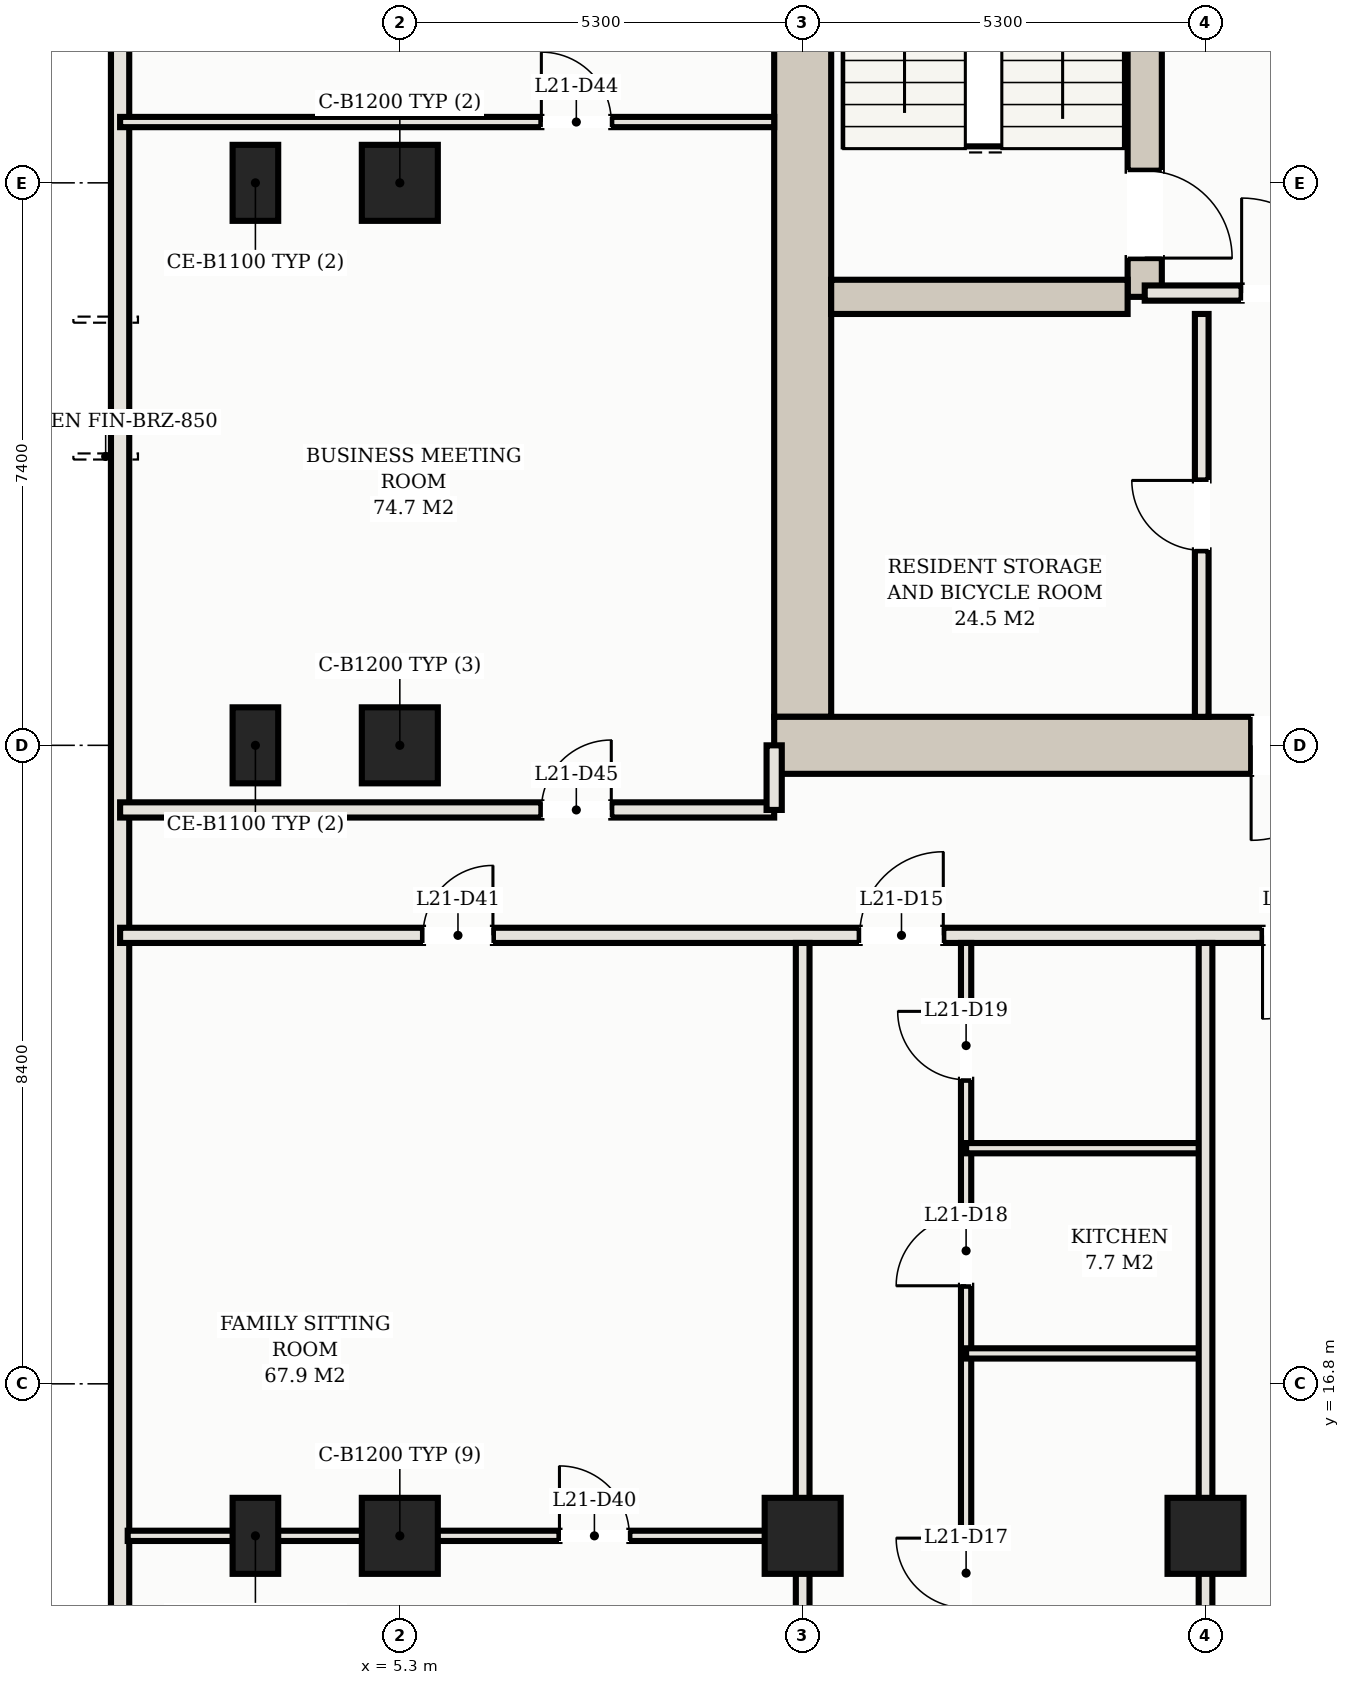
"""IFC4 building model, lengths in metres.
Left out: names, types, materials, properties, quantities, classifications, styles, units other than length and angle.
Written with IfcOpenShell. Run it as: python <this file> out.ifc"""

import sys

from ifc_helpers import new_model, si_unit, direction, frame, frame_2d, origin, origin_2d, place, context, subcontext, project, spatial, rectangle, hollow_rectangle, extrude, element, fill, save


model = new_model("IFC4")
c1 = context("Model", 3, precision=1e-05, world=origin(), true_north=direction((0.0, 1.0)))
c2 = subcontext(c1, "Body", "Model", "MODEL_VIEW")
j1 = project(units=[si_unit("LENGTHUNIT", "METRE"), si_unit("PLANEANGLEUNIT", "RADIAN")], contexts=[c1])
p1 = place(None, origin())
s1 = spatial("IfcSite", under=j1, at=p1, CompositionType="ELEMENT")
p2 = place(p1, origin())
s2 = spatial("IfcBuilding", under=s1, at=p2, CompositionType="ELEMENT")
p3 = place(p2, frame((0.0, 0.0, 81.7)))
s3 = spatial("IfcBuildingStorey", under=s2, at=p3, CompositionType="ELEMENT", Elevation=81.7)
p4 = place(p3, frame((10.6, 25.575, 0.0), z_axis=(0.0, 0.0, 1.0), x_axis=(0.0, 1.0, 0.0)))
e1 = element("IfcWall", 1, at=p4, inside=s3, PredefinedType="SHEAR", context=c2, shape_type="SweptSolid", body=[
    extrude(rectangle(XDim=14.05, YDim=0.75, at=frame_2d((7.025, 0.0))), origin(), (0.0, 0.0, 1.0), 3.09),
])
p5 = place(p3, frame((10.225, 25.2, 0.0), z_axis=(0.0, 0.0, 1.0), x_axis=(1.0, 0.0, 0.0)))
e2 = element("IfcWall", 2, at=p5, inside=s3, PredefinedType="SHEAR", context=c2, shape_type="SweptSolid", body=[
    extrude(rectangle(XDim=8.175, YDim=0.75, at=frame_2d((4.087, 0.0))), origin(), (0.0, 0.0, 1.0), 3.09),
])
p6 = place(p5, frame((6.275, 0.0, 0.0)))
e3 = element("IfcOpeningElement", 3, at=p6, cuts=e2, PredefinedType="OPENING", context=c2, shape_type="SweptSolid", body=[
    extrude(rectangle(XDim=1.25, YDim=2.2, at=frame_2d((0.625, 1.1))), frame((0.0, 0.385, 0.0), z_axis=(0.0, -1.0, 0.0), x_axis=(1.0, 0.0, 0.0)), (0.0, 0.0, 1.0), 0.77),
])
p7 = place(p3, frame((15.1, 31.1, 0.0), z_axis=(0.0, 0.0, 1.0), x_axis=(0.0, 1.0, 0.0)))
e4 = element("IfcWall", 4, at=p7, inside=s3, PredefinedType="SHEAR", context=c2, shape_type="SweptSolid", body=[
    extrude(rectangle(XDim=8.525, YDim=0.45, at=frame_2d((4.262, 0.0))), origin(), (0.0, 0.0, 1.0), 3.09),
])
p8 = place(p7, frame((0.51, 0.0, 0.0)))
e5 = element("IfcOpeningElement", 5, at=p8, cuts=e4, PredefinedType="OPENING", context=c2, shape_type="SweptSolid", body=[
    extrude(rectangle(XDim=1.15, YDim=2.2, at=frame_2d((0.575, 1.1))), frame((0.0, 0.235, 0.0), z_axis=(0.0, -1.0, 0.0), x_axis=(1.0, 0.0, 0.0)), (0.0, 0.0, 1.0), 0.47),
])
p9 = place(p3, frame((10.975, 31.1, 0.0), z_axis=(0.0, 0.0, 1.0), x_axis=(1.0, 0.0, 0.0)))
e6 = element("IfcWall", 6, at=p9, inside=s3, PredefinedType="SHEAR", context=c2, shape_type="SweptSolid", body=[
    extrude(rectangle(XDim=3.9, YDim=0.45, at=frame_2d((1.95, 0.0))), origin(), (0.0, 0.0, 1.0), 3.09),
])
for number, where, z_axis, x_axis in (
    (7, (10.6, 14.8, 0.0), (0.0, 0.0, 1.0), (1.0, 0.0, 0.0)),
    (8, (15.9, 14.8, 0.0), (0.0, 0.0, 1.0), (1.0, 0.0, 0.0)),
):
    element("IfcColumn", number, at=place(p3, frame(where, z_axis=z_axis, x_axis=x_axis)), inside=s3, PredefinedType="COLUMN", context=c2, shape_type="SweptSolid", body=[
        extrude(hollow_rectangle(XDim=1.0, YDim=1.0, WallThickness=0.036, at=origin_2d()), origin(), (0.0, 0.0, 1.0), 3.3),
    ])
for number, where, z_axis, x_axis in (
    (9, (3.4, 14.8, 0.0), (0.0, 0.0, 1.0), (1.0, 0.0, 0.0)),
    (10, (3.4, 25.2, 0.0), (0.0, 0.0, 1.0), (1.0, 0.0, 0.0)),
    (11, (3.4, 32.6, 0.0), (0.0, 0.0, 1.0), (1.0, 0.0, 0.0)),
):
    element("IfcColumn", number, at=place(p3, frame(where, z_axis=z_axis, x_axis=x_axis)), inside=s3, PredefinedType="COLUMN", context=c2, shape_type="SweptSolid", body=[
        extrude(hollow_rectangle(XDim=0.6, YDim=1.0, WallThickness=0.032, at=origin_2d()), origin(), (0.0, 0.0, 1.0), 3.3),
    ])
for number, where, z_axis, x_axis in (
    (12, (5.3, 14.8, 0.0), (0.0, 0.0, 1.0), (1.0, 0.0, 0.0)),
    (13, (5.3, 25.2, 0.0), (0.0, 0.0, 1.0), (1.0, 0.0, 0.0)),
    (14, (5.3, 32.6, 0.0), (0.0, 0.0, 1.0), (1.0, 0.0, 0.0)),
):
    element("IfcColumn", number, at=place(p3, frame(where, z_axis=z_axis, x_axis=x_axis)), inside=s3, PredefinedType="COLUMN", context=c2, shape_type="SweptSolid", body=[
        extrude(hollow_rectangle(XDim=1.0, YDim=1.0, WallThickness=0.036, at=origin_2d()), origin(), (0.0, 0.0, 1.0), 3.3),
    ])
p10 = place(p3, frame((1.62, 35.33, 0.0), z_axis=(0.0, 0.0, 1.0), x_axis=(0.0, -1.0, 0.0)))
e15 = element("IfcWall", 15, at=p10, inside=s3, PredefinedType="SOLIDWALL", context=c2, shape_type="SweptSolid", body=[
    extrude(rectangle(XDim=28.41, YDim=0.24, at=frame_2d((14.205, 0.0))), origin(), (0.0, 0.0, 1.0), 3.09),
])
p11 = place(p3, frame((15.1, 31.15, 0.0), z_axis=(0.0, 0.0, 1.0), x_axis=(1.0, 0.0, 0.0)))
e16 = element("IfcWall", 16, at=p11, inside=s3, PredefinedType="PARTITIONING", context=c2, shape_type="SweptSolid", body=[
    extrude(rectangle(XDim=3.25, YDim=0.2, at=frame_2d((1.625, 0.0))), origin(), (0.0, 0.0, 1.0), 2.38),
])
p12 = place(p11, frame((1.275, 0.0, 0.0)))
e17 = element("IfcOpeningElement", 17, at=p12, cuts=e16, PredefinedType="OPENING", context=c2, shape_type="SweptSolid", body=[
    extrude(rectangle(XDim=1.25, YDim=2.2, at=frame_2d((0.625, 1.1))), frame((0.0, 0.11, 0.0), z_axis=(0.0, -1.0, 0.0), x_axis=(1.0, 0.0, 0.0)), (0.0, 0.0, 1.0), 0.22),
])
p13 = place(p3, frame((15.85, 25.575, 0.0), z_axis=(0.0, 0.0, 1.0), x_axis=(0.0, 1.0, 0.0)))
e18 = element("IfcWall", 18, at=p13, inside=s3, PredefinedType="PARTITIONING", context=c2, shape_type="SweptSolid", body=[
    extrude(rectangle(XDim=5.3, YDim=0.18, at=frame_2d((2.65, 0.0))), origin(), (0.0, 0.0, 1.0), 2.38),
])
p14 = place(p13, frame((2.19, 0.0, 0.0)))
e19 = element("IfcOpeningElement", 19, at=p14, cuts=e18, PredefinedType="OPENING", context=c2, shape_type="SweptSolid", body=[
    extrude(rectangle(XDim=0.92, YDim=2.15, at=frame_2d((0.46, 1.075))), frame((0.0, 0.1, 0.0), z_axis=(0.0, -1.0, 0.0), x_axis=(1.0, 0.0, 0.0)), (0.0, 0.0, 1.0), 0.2),
])
p15 = place(p3, frame((1.62, 22.7, 0.0), z_axis=(0.0, 0.0, 1.0), x_axis=(1.0, 0.0, 0.0)))
e20 = element("IfcWall", 20, at=p15, inside=s3, PredefinedType="PARTITIONING", context=c2, shape_type="SweptSolid", body=[
    extrude(rectangle(XDim=49.76, YDim=0.2, at=frame_2d((24.88, 0.0))), origin(), (0.0, 0.0, 1.0), 2.38),
])
p16 = place(p15, frame((9.73, 0.0, 0.0)))
e21 = element("IfcOpeningElement", 21, at=p16, cuts=e20, PredefinedType="OPENING", context=c2, shape_type="SweptSolid", body=[
    extrude(rectangle(XDim=1.1, YDim=2.25, at=frame_2d((0.55, 1.125))), frame((0.0, 0.11, 0.0), z_axis=(0.0, -1.0, 0.0), x_axis=(1.0, 0.0, 0.0)), (0.0, 0.0, 1.0), 0.22),
])
p17 = place(p15, frame((15.03, 0.0, 0.0)))
e22 = element("IfcOpeningElement", 22, at=p17, cuts=e20, PredefinedType="OPENING", context=c2, shape_type="SweptSolid", body=[
    extrude(rectangle(XDim=1.1, YDim=2.25, at=frame_2d((0.55, 1.125))), frame((0.0, 0.11, 0.0), z_axis=(0.0, -1.0, 0.0), x_axis=(1.0, 0.0, 0.0)), (0.0, 0.0, 1.0), 0.22),
])
p18 = place(p15, frame((20.33, 0.0, 0.0)))
e23 = element("IfcOpeningElement", 23, at=p18, cuts=e20, PredefinedType="OPENING", context=c2, shape_type="SweptSolid", body=[
    extrude(rectangle(XDim=1.1, YDim=2.25, at=frame_2d((0.55, 1.125))), frame((0.0, 0.11, 0.0), z_axis=(0.0, -1.0, 0.0), x_axis=(1.0, 0.0, 0.0)), (0.0, 0.0, 1.0), 0.22),
])
p19 = place(p15, frame((25.63, 0.0, 0.0)))
e24 = element("IfcOpeningElement", 24, at=p19, cuts=e20, PredefinedType="OPENING", context=c2, shape_type="SweptSolid", body=[
    extrude(rectangle(XDim=1.1, YDim=2.25, at=frame_2d((0.55, 1.125))), frame((0.0, 0.11, 0.0), z_axis=(0.0, -1.0, 0.0), x_axis=(1.0, 0.0, 0.0)), (0.0, 0.0, 1.0), 0.22),
])
p20 = place(p15, frame((33.33, 0.0, 0.0)))
e25 = element("IfcOpeningElement", 25, at=p20, cuts=e20, PredefinedType="OPENING", context=c2, shape_type="SweptSolid", body=[
    extrude(rectangle(XDim=1.1, YDim=2.25, at=frame_2d((0.55, 1.125))), frame((0.0, 0.11, 0.0), z_axis=(0.0, -1.0, 0.0), x_axis=(1.0, 0.0, 0.0)), (0.0, 0.0, 1.0), 0.22),
])
p21 = place(p15, frame((3.985, 0.0, 0.0)))
e26 = element("IfcOpeningElement", 26, at=p21, cuts=e20, PredefinedType="OPENING", context=c2, shape_type="SweptSolid", body=[
    extrude(rectangle(XDim=0.92, YDim=2.15, at=frame_2d((0.46, 1.075))), frame((0.0, 0.11, 0.0), z_axis=(0.0, -1.0, 0.0), x_axis=(1.0, 0.0, 0.0)), (0.0, 0.0, 1.0), 0.22),
])
p22 = place(p15, frame((44.855, 0.0, 0.0)))
e27 = element("IfcOpeningElement", 27, at=p22, cuts=e20, PredefinedType="OPENING", context=c2, shape_type="SweptSolid", body=[
    extrude(rectangle(XDim=0.92, YDim=2.15, at=frame_2d((0.46, 1.075))), frame((0.0, 0.11, 0.0), z_axis=(0.0, -1.0, 0.0), x_axis=(1.0, 0.0, 0.0)), (0.0, 0.0, 1.0), 0.22),
])
p23 = place(p3, frame((1.62, 24.35, 0.0), z_axis=(0.0, 0.0, 1.0), x_axis=(1.0, 0.0, 0.0)))
e28 = element("IfcWall", 28, at=p23, inside=s3, PredefinedType="PARTITIONING", context=c2, shape_type="SweptSolid", body=[
    extrude(rectangle(XDim=8.605, YDim=0.2, at=frame_2d((4.302, 0.0))), origin(), (0.0, 0.0, 1.0), 2.38),
])
p24 = place(p23, frame((5.542, 0.0, 0.0)))
e29 = element("IfcOpeningElement", 29, at=p24, cuts=e28, PredefinedType="OPENING", context=c2, shape_type="SweptSolid", body=[
    extrude(rectangle(XDim=0.92, YDim=2.15, at=frame_2d((0.46, 1.075))), frame((0.0, 0.11, 0.0), z_axis=(0.0, -1.0, 0.0), x_axis=(1.0, 0.0, 0.0)), (0.0, 0.0, 1.0), 0.22),
])
p25 = place(p3, frame((10.225, 24.35, 0.0), z_axis=(0.0, 0.0, 1.0), x_axis=(0.0, 1.0, 0.0)))
e30 = element("IfcWall", 30, at=p25, inside=s3, PredefinedType="PARTITIONING", context=c2, shape_type="SweptSolid", body=[
    extrude(rectangle(XDim=0.85, YDim=0.2, at=frame_2d((0.425, 0.0))), origin(), (0.0, 0.0, 1.0), 2.38),
])
p26 = place(p3, frame((10.6, 1.62, 0.0), z_axis=(0.0, 0.0, 1.0), x_axis=(0.0, 1.0, 0.0)))
e31 = element("IfcWall", 31, at=p26, inside=s3, PredefinedType="PARTITIONING", context=c2, shape_type="SweptSolid", body=[
    extrude(rectangle(XDim=20.98, YDim=0.18, at=frame_2d((10.49, 0.0))), origin(), (0.0, 0.0, 1.0), 2.335),
])
p27 = place(p3, frame((12.75, 11.42, 0.0), z_axis=(0.0, 0.0, 1.0), x_axis=(0.0, 1.0, 0.0)))
e32 = element("IfcWall", 32, at=p27, inside=s3, PredefinedType="PARTITIONING", context=c2, shape_type="SweptSolid", body=[
    extrude(rectangle(XDim=11.18, YDim=0.135, at=frame_2d((5.59, 0.0))), origin(), (0.0, 0.0, 1.0), 2.38),
])
p28 = place(p27, frame((2.43, 0.0, 0.0)))
e33 = element("IfcOpeningElement", 33, at=p28, cuts=e32, PredefinedType="OPENING", context=c2, shape_type="SweptSolid", body=[
    extrude(rectangle(XDim=0.92, YDim=2.15, at=frame_2d((0.46, 1.075))), frame((0.0, 0.078, 0.0), z_axis=(0.0, -1.0, 0.0), x_axis=(1.0, 0.0, 0.0)), (0.0, 0.0, 1.0), 0.155),
])
p29 = place(p27, frame((6.67, 0.0, 0.0)))
e34 = element("IfcOpeningElement", 34, at=p29, cuts=e32, PredefinedType="OPENING", context=c2, shape_type="SweptSolid", body=[
    extrude(rectangle(XDim=0.92, YDim=2.15, at=frame_2d((0.46, 1.075))), frame((0.0, 0.078, 0.0), z_axis=(0.0, -1.0, 0.0), x_axis=(1.0, 0.0, 0.0)), (0.0, 0.0, 1.0), 0.155),
])
p30 = place(p27, frame((9.38, 0.0, 0.0)))
e35 = element("IfcOpeningElement", 35, at=p30, cuts=e32, PredefinedType="OPENING", context=c2, shape_type="SweptSolid", body=[
    extrude(rectangle(XDim=0.9, YDim=2.15, at=frame_2d((0.45, 1.075))), frame((0.0, 0.078, 0.0), z_axis=(0.0, -1.0, 0.0), x_axis=(1.0, 0.0, 0.0)), (0.0, 0.0, 1.0), 0.155),
])
for number, where, z_axis, x_axis in (
    (36, (12.75, 17.2, 0.0), (0.0, 0.0, 1.0), (1.0, 0.0, 0.0)),
    (37, (12.75, 19.9, 0.0), (0.0, 0.0, 1.0), (1.0, 0.0, 0.0)),
):
    element("IfcWall", number, at=place(p3, frame(where, z_axis=z_axis, x_axis=x_axis)), inside=s3, PredefinedType="PARTITIONING", context=c2, shape_type="SweptSolid", body=[
        extrude(rectangle(XDim=3.15, YDim=0.135, at=frame_2d((1.575, 0.0))), origin(), (0.0, 0.0, 1.0), 2.38),
    ])
p31 = place(p3, frame((15.9, 1.62, 0.0), z_axis=(0.0, 0.0, 1.0), x_axis=(0.0, 1.0, 0.0)))
e38 = element("IfcWall", 38, at=p31, inside=s3, PredefinedType="PARTITIONING", context=c2, shape_type="SweptSolid", body=[
    extrude(rectangle(XDim=20.98, YDim=0.18, at=frame_2d((10.49, 0.0))), origin(), (0.0, 0.0, 1.0), 2.335),
])
p32 = place(p3, frame((1.72, 14.8, 0.0), z_axis=(0.0, 0.0, 1.0), x_axis=(1.0, 0.0, 0.0)))
e39 = element("IfcWall", 39, at=p32, inside=s3, PredefinedType="PARTITIONING", context=c2, shape_type="SweptSolid", body=[
    extrude(rectangle(XDim=8.88, YDim=0.135, at=frame_2d((4.44, 0.0))), origin(), (0.0, 0.0, 1.0), 2.335),
])
p33 = place(p32, frame((5.68, 0.0, 0.0)))
e40 = element("IfcOpeningElement", 40, at=p33, cuts=e39, PredefinedType="OPENING", context=c2, shape_type="SweptSolid", body=[
    extrude(rectangle(XDim=0.92, YDim=2.15, at=frame_2d((0.46, 1.075))), frame((0.0, 0.078, 0.0), z_axis=(0.0, -1.0, 0.0), x_axis=(1.0, 0.0, 0.0)), (0.0, 0.0, 1.0), 0.155),
])
p34 = place(p3, frame((1.62, 33.4, 0.0), z_axis=(0.0, 0.0, 1.0), x_axis=(1.0, 0.0, 0.0)))
e41 = element("IfcWall", 41, at=p34, inside=s3, PredefinedType="PARTITIONING", context=c2, shape_type="SweptSolid", body=[
    extrude(rectangle(XDim=8.605, YDim=0.135, at=frame_2d((4.302, 0.0))), origin(), (0.0, 0.0, 1.0), 2.38),
])
p35 = place(p34, frame((5.542, 0.0, 0.0)))
e42 = element("IfcOpeningElement", 42, at=p35, cuts=e41, PredefinedType="OPENING", context=c2, shape_type="SweptSolid", body=[
    extrude(rectangle(XDim=0.92, YDim=2.15, at=frame_2d((0.46, 1.075))), frame((0.0, 0.078, 0.0), z_axis=(0.0, -1.0, 0.0), x_axis=(1.0, 0.0, 0.0)), (0.0, 0.0, 1.0), 0.155),
])
p36 = place(p6, frame((1.25, 0.0, 0.0), z_axis=(0.0, 0.0, 1.0), x_axis=(-1.0, 0.0, 0.0)))
e43 = element("IfcDoor", 43, at=p36, inside=s3, OperationType="SINGLE_SWING_RIGHT", PredefinedType="DOOR", context=c2, shape_type="SweptSolid", body=[
    extrude(rectangle(XDim=1.25, YDim=2.2, at=frame_2d((0.625, 1.1))), frame((0.0, 0.025, 0.0), z_axis=(0.0, -1.0, 0.0), x_axis=(1.0, 0.0, 0.0)), (0.0, 0.0, 1.0), 0.05),
])
fill(e3, e43)
p37 = place(p12, origin())
e44 = element("IfcDoor", 44, at=p37, inside=s3, OperationType="SINGLE_SWING_LEFT", PredefinedType="DOOR", context=c2, shape_type="SweptSolid", body=[
    extrude(rectangle(XDim=1.25, YDim=2.2, at=frame_2d((0.625, 1.1))), frame((0.0, 0.025, 0.0), z_axis=(0.0, -1.0, 0.0), x_axis=(1.0, 0.0, 0.0)), (0.0, 0.0, 1.0), 0.05),
])
fill(e17, e44)
p38 = place(p8, frame((1.15, 0.0, 0.0), z_axis=(0.0, 0.0, 1.0), x_axis=(-1.0, 0.0, 0.0)))
e45 = element("IfcDoor", 45, at=p38, inside=s3, OperationType="SINGLE_SWING_RIGHT", PredefinedType="DOOR", context=c2, shape_type="SweptSolid", body=[
    extrude(rectangle(XDim=1.15, YDim=2.2, at=frame_2d((0.575, 1.1))), frame((0.0, 0.025, 0.0), z_axis=(0.0, -1.0, 0.0), x_axis=(1.0, 0.0, 0.0)), (0.0, 0.0, 1.0), 0.05),
])
fill(e5, e45)
p39 = place(p14, origin())
e46 = element("IfcDoor", 46, at=p39, inside=s3, OperationType="SINGLE_SWING_RIGHT", PredefinedType="DOOR", context=c2, shape_type="SweptSolid", body=[
    extrude(rectangle(XDim=0.92, YDim=2.15, at=frame_2d((0.46, 1.075))), frame((0.0, 0.025, 0.0), z_axis=(0.0, -1.0, 0.0), x_axis=(1.0, 0.0, 0.0)), (0.0, 0.0, 1.0), 0.05),
])
fill(e19, e46)
p40 = place(p16, origin())
e47 = element("IfcDoor", 47, at=p40, inside=s3, OperationType="SINGLE_SWING_RIGHT", PredefinedType="DOOR", context=c2, shape_type="SweptSolid", body=[
    extrude(rectangle(XDim=1.1, YDim=2.25, at=frame_2d((0.55, 1.125))), frame((0.0, 0.025, 0.0), z_axis=(0.0, -1.0, 0.0), x_axis=(1.0, 0.0, 0.0)), (0.0, 0.0, 1.0), 0.05),
])
fill(e21, e47)
p41 = place(p28, origin())
e48 = element("IfcDoor", 48, at=p41, inside=s3, OperationType="SINGLE_SWING_RIGHT", PredefinedType="DOOR", context=c2, shape_type="SweptSolid", body=[
    extrude(rectangle(XDim=0.92, YDim=2.15, at=frame_2d((0.46, 1.075))), frame((0.0, 0.025, 0.0), z_axis=(0.0, -1.0, 0.0), x_axis=(1.0, 0.0, 0.0)), (0.0, 0.0, 1.0), 0.05),
])
fill(e33, e48)
p42 = place(p29, origin())
e49 = element("IfcDoor", 49, at=p42, inside=s3, OperationType="SINGLE_SWING_LEFT", PredefinedType="DOOR", context=c2, shape_type="SweptSolid", body=[
    extrude(rectangle(XDim=0.92, YDim=2.15, at=frame_2d((0.46, 1.075))), frame((0.0, 0.025, 0.0), z_axis=(0.0, -1.0, 0.0), x_axis=(1.0, 0.0, 0.0)), (0.0, 0.0, 1.0), 0.05),
])
fill(e34, e49)
p43 = place(p30, origin())
e50 = element("IfcDoor", 50, at=p43, inside=s3, OperationType="SINGLE_SWING_RIGHT", PredefinedType="DOOR", context=c2, shape_type="SweptSolid", body=[
    extrude(rectangle(XDim=0.9, YDim=2.15, at=frame_2d((0.45, 1.075))), frame((0.0, 0.025, 0.0), z_axis=(0.0, -1.0, 0.0), x_axis=(1.0, 0.0, 0.0)), (0.0, 0.0, 1.0), 0.05),
])
fill(e35, e50)
p44 = place(p17, frame((1.1, 0.0, 0.0), z_axis=(0.0, 0.0, 1.0), x_axis=(-1.0, 0.0, 0.0)))
e51 = element("IfcDoor", 51, at=p44, inside=s3, OperationType="SINGLE_SWING_RIGHT", PredefinedType="DOOR", context=c2, shape_type="SweptSolid", body=[
    extrude(rectangle(XDim=1.1, YDim=2.25, at=frame_2d((0.55, 1.125))), frame((0.0, 0.025, 0.0), z_axis=(0.0, -1.0, 0.0), x_axis=(1.0, 0.0, 0.0)), (0.0, 0.0, 1.0), 0.05),
])
fill(e22, e51)
p45 = place(p33, origin())
e52 = element("IfcDoor", 52, at=p45, inside=s3, OperationType="SINGLE_SWING_LEFT", PredefinedType="DOOR", context=c2, shape_type="SweptSolid", body=[
    extrude(rectangle(XDim=0.92, YDim=2.15, at=frame_2d((0.46, 1.075))), frame((0.0, 0.025, 0.0), z_axis=(0.0, -1.0, 0.0), x_axis=(1.0, 0.0, 0.0)), (0.0, 0.0, 1.0), 0.05),
])
fill(e40, e52)
p46 = place(p21, origin())
e53 = element("IfcDoor", 53, at=p46, inside=s3, OperationType="SINGLE_SWING_RIGHT", PredefinedType="DOOR", context=c2, shape_type="SweptSolid", body=[
    extrude(rectangle(XDim=0.92, YDim=2.15, at=frame_2d((0.46, 1.075))), frame((0.0, 0.025, 0.0), z_axis=(0.0, -1.0, 0.0), x_axis=(1.0, 0.0, 0.0)), (0.0, 0.0, 1.0), 0.05),
])
fill(e26, e53)
p47 = place(p35, origin())
e54 = element("IfcDoor", 54, at=p47, inside=s3, OperationType="SINGLE_SWING_LEFT", PredefinedType="DOOR", context=c2, shape_type="SweptSolid", body=[
    extrude(rectangle(XDim=0.92, YDim=2.15, at=frame_2d((0.46, 1.075))), frame((0.0, 0.025, 0.0), z_axis=(0.0, -1.0, 0.0), x_axis=(1.0, 0.0, 0.0)), (0.0, 0.0, 1.0), 0.05),
])
fill(e42, e54)
p48 = place(p24, origin())
e55 = element("IfcDoor", 55, at=p48, inside=s3, OperationType="SINGLE_SWING_RIGHT", PredefinedType="DOOR", context=c2, shape_type="SweptSolid", body=[
    extrude(rectangle(XDim=0.92, YDim=2.15, at=frame_2d((0.46, 1.075))), frame((0.0, 0.025, 0.0), z_axis=(0.0, -1.0, 0.0), x_axis=(1.0, 0.0, 0.0)), (0.0, 0.0, 1.0), 0.05),
])
fill(e29, e55)
save(model, sys.argv[1])
